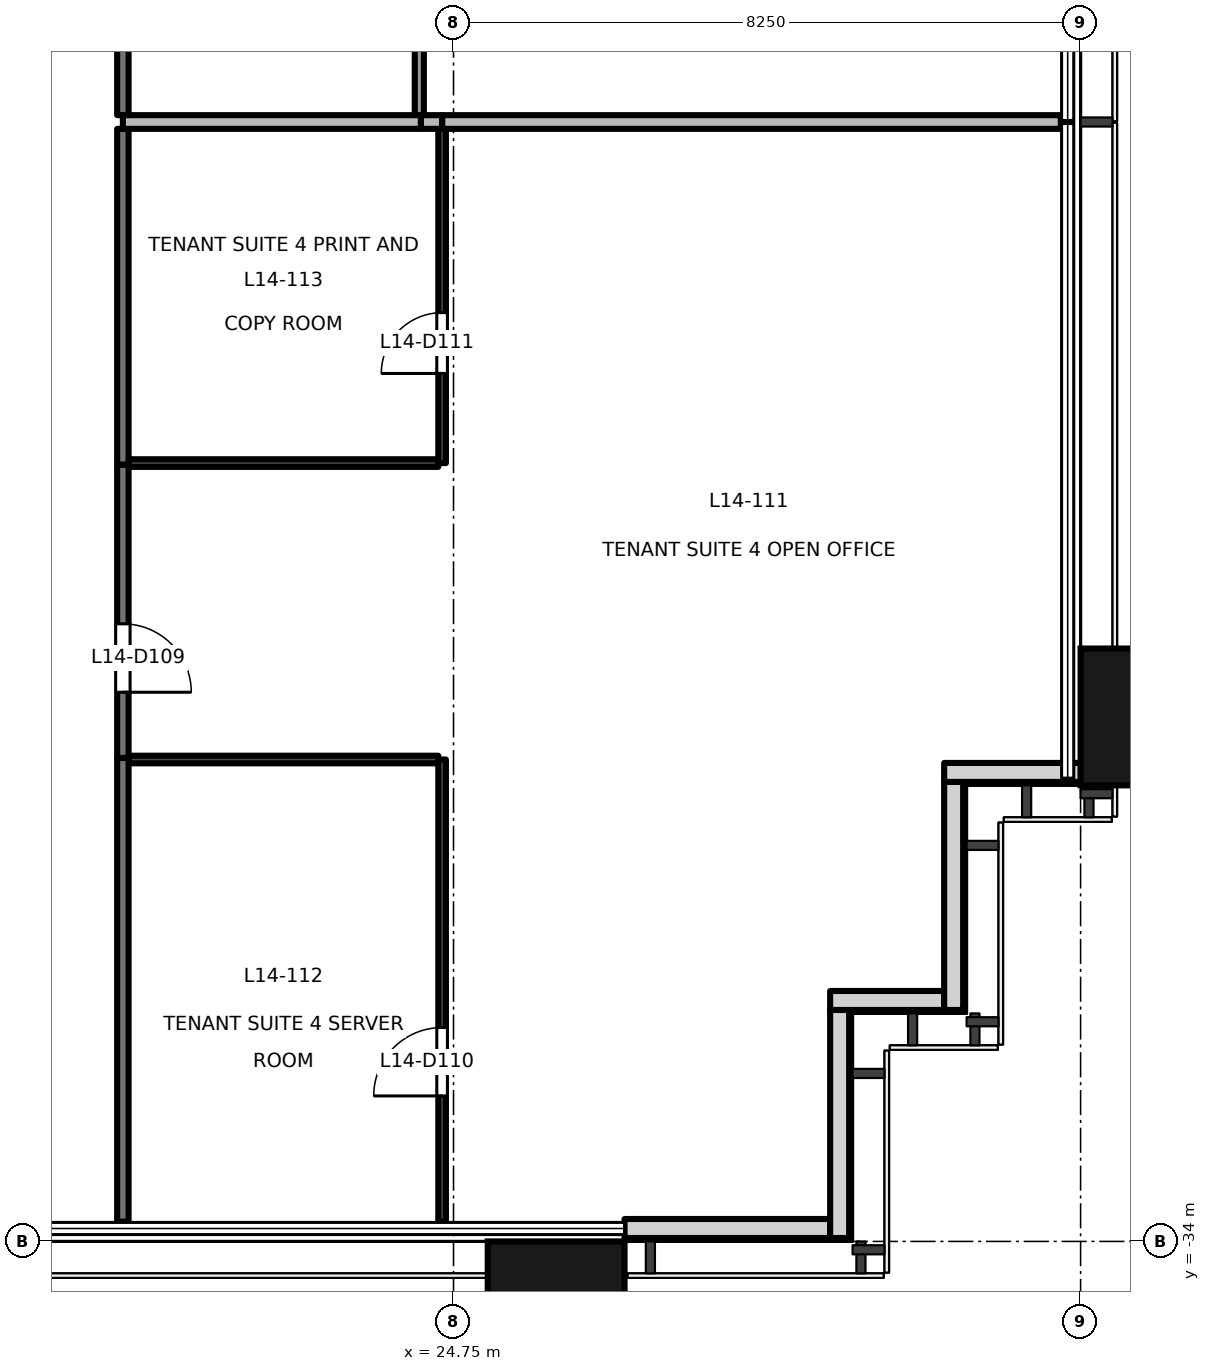
"""IFC4 building model, lengths in metres.
Left out: names, types, materials, properties, quantities, classifications, styles, units other than length and angle.
Written with IfcOpenShell. Run it as: python <this file> out.ifc"""

import sys

from ifc_helpers import new_model, si_unit, direction, frame, frame_2d, origin, origin_2d, place, context, subcontext, project, spatial, rectangle, extrude, element, fill, save


model = new_model("IFC4")
c1 = context("Model", 3, precision=1e-05, world=origin(), true_north=direction((0.0, 1.0)))
c2 = subcontext(c1, "Body", "Model", "MODEL_VIEW")
j1 = project(units=[si_unit("LENGTHUNIT", "METRE"), si_unit("PLANEANGLEUNIT", "RADIAN")], contexts=[c1])
p1 = place(None, origin())
s1 = spatial("IfcSite", under=j1, at=p1, CompositionType="ELEMENT")
p2 = place(p1, origin())
s2 = spatial("IfcBuilding", under=s1, at=p2, CompositionType="ELEMENT")
p3 = place(p2, frame((0.0, 0.0, 65.2)))
s3 = spatial("IfcBuildingStorey", under=s2, at=p3, CompositionType="ELEMENT", Elevation=65.2)
for number, where, z_axis, x_axis in (
    (1, (26.1, -34.9, -0.2), (0.0, 0.0, 1.0), (1.0, 0.0, 0.0)),
    (2, (33.9, -27.1, -0.2), (0.0, 0.0, 1.0), (0.0, 1.0, 0.0)),
):
    element("IfcColumn", number, at=place(p3, frame(where, z_axis=z_axis, x_axis=x_axis)), inside=s3, PredefinedType="COLUMN", context=c2, shape_type="SweptSolid", body=[
        extrude(rectangle(XDim=1.8, YDim=1.8, at=origin_2d()), origin(), (0.0, 0.0, 1.0), 4.1),
    ])
p4 = place(p3, frame((27.0, -33.83, 0.0), z_axis=(0.0, 0.0, 1.0), x_axis=(1.0, 0.0, 0.0)))
e3 = element("IfcWall", 3, at=p4, inside=s3, PredefinedType="SOLIDWALL", context=c2, shape_type="SweptSolid", body=[
    extrude(rectangle(XDim=2.705, YDim=0.25, at=frame_2d((1.353, 0.0))), origin(), (0.0, 0.0, 1.0), 3.9),
])
p5 = place(p3, frame((29.83, -33.955, 0.0), z_axis=(0.0, 0.0, 1.0), x_axis=(0.0, 1.0, 0.0)))
e4 = element("IfcWall", 4, at=p5, inside=s3, PredefinedType="SOLIDWALL", context=c2, shape_type="SweptSolid", body=[
    extrude(rectangle(XDim=3.0, YDim=0.25, at=frame_2d((1.5, 0.0))), origin(), (0.0, 0.0, 1.0), 3.9),
])
p6 = place(p3, frame((29.705, -30.83, 0.0), z_axis=(0.0, 0.0, 1.0), x_axis=(1.0, 0.0, 0.0)))
e5 = element("IfcWall", 5, at=p6, inside=s3, PredefinedType="SOLIDWALL", context=c2, shape_type="SweptSolid", body=[
    extrude(rectangle(XDim=1.5, YDim=0.25, at=frame_2d((0.75, 0.0))), origin(), (0.0, 0.0, 1.0), 3.9),
])
p7 = place(p3, frame((31.33, -30.955, 0.0), z_axis=(0.0, 0.0, 1.0), x_axis=(0.0, 1.0, 0.0)))
e6 = element("IfcWall", 6, at=p7, inside=s3, PredefinedType="SOLIDWALL", context=c2, shape_type="SweptSolid", body=[
    extrude(rectangle(XDim=3.0, YDim=0.25, at=frame_2d((1.5, 0.0))), origin(), (0.0, 0.0, 1.0), 3.9),
])
p8 = place(p3, frame((31.205, -27.83, 0.0), z_axis=(0.0, 0.0, 1.0), x_axis=(1.0, 0.0, 0.0)))
e7 = element("IfcWall", 7, at=p8, inside=s3, PredefinedType="SOLIDWALL", context=c2, shape_type="SweptSolid", body=[
    extrude(rectangle(XDim=1.8, YDim=0.25, at=frame_2d((0.9, 0.0))), origin(), (0.0, 0.0, 1.0), 3.9),
])
p9 = place(p3, frame((20.4, -23.78, 0.0), z_axis=(0.0, 0.0, 1.0), x_axis=(0.0, -1.0, 0.0)))
e8 = element("IfcWall", 8, at=p9, inside=s3, PredefinedType="PARTITIONING", context=c2, shape_type="SweptSolid", body=[
    extrude(rectangle(XDim=3.86, YDim=0.15, at=frame_2d((1.93, 0.0))), origin(), (0.0, 0.0, 1.0), 3.3),
])
p10 = place(p9, frame((2.095, 0.0, 0.0)))
e9 = element("IfcOpeningElement", 9, at=p10, cuts=e8, PredefinedType="OPENING", context=c2, shape_type="SweptSolid", body=[
    extrude(rectangle(XDim=0.9, YDim=2.1, at=frame_2d((0.45, 1.05))), frame((0.0, 0.085, 0.0), z_axis=(0.0, -1.0, 0.0), x_axis=(1.0, 0.0, 0.0)), (0.0, 0.0, 1.0), 0.171),
])
p11 = place(p3, frame((20.4, -27.64, 0.0), z_axis=(0.0, 0.0, 1.0), x_axis=(0.0, -1.0, 0.0)))
e10 = element("IfcWall", 10, at=p11, inside=s3, PredefinedType="PARTITIONING", context=c2, shape_type="SweptSolid", body=[
    extrude(rectangle(XDim=6.1, YDim=0.15, at=frame_2d((3.05, 0.0))), origin(), (0.0, 0.0, 1.0), 3.9),
])
p12 = place(p3, frame((20.4, -19.363, 0.0), z_axis=(0.0, 0.0, 1.0), x_axis=(0.0, -1.0, 0.0)))
e11 = element("IfcWall", 11, at=p12, inside=s3, PredefinedType="PARTITIONING", context=c2, shape_type="SweptSolid", body=[
    extrude(rectangle(XDim=4.417, YDim=0.15, at=frame_2d((2.208, 0.0))), origin(), (0.0, 0.0, 1.0), 3.3),
])
p13 = place(p3, frame((20.4, -10.253, 0.0), z_axis=(0.0, 0.0, 1.0), x_axis=(0.0, -1.0, 0.0)))
e12 = element("IfcWall", 12, at=p13, inside=s3, PredefinedType="PARTITIONING", context=c2, shape_type="SweptSolid", body=[
    extrude(rectangle(XDim=8.93, YDim=0.15, at=frame_2d((4.465, 0.0))), origin(), (0.0, 0.0, 1.0), 3.3),
])
p14 = place(p3, frame((24.55, -27.66, 0.0), z_axis=(0.0, 0.0, 1.0), x_axis=(-1.0, 0.0, 0.0)))
e13 = element("IfcWall", 13, at=p14, inside=s3, PredefinedType="PARTITIONING", context=c2, shape_type="SweptSolid", body=[
    extrude(rectangle(XDim=4.075, YDim=0.1, at=frame_2d((2.038, 0.0))), origin(), (0.0, 0.0, 1.0), 3.9),
])
p15 = place(p3, frame((24.6, -33.74, 0.0), z_axis=(0.0, 0.0, 1.0), x_axis=(0.0, 1.0, 0.0)))
e14 = element("IfcWall", 14, at=p15, inside=s3, PredefinedType="PARTITIONING", context=c2, shape_type="SweptSolid", body=[
    extrude(rectangle(XDim=6.08, YDim=0.1, at=frame_2d((3.04, 0.0))), origin(), (0.0, 0.0, 1.0), 3.9),
])
p16 = place(p15, frame((1.654, 0.0, 0.0)))
e15 = element("IfcOpeningElement", 15, at=p16, cuts=e14, PredefinedType="OPENING", context=c2, shape_type="SweptSolid", body=[
    extrude(rectangle(XDim=0.9, YDim=2.1, at=frame_2d((0.45, 1.05))), frame((0.0, 0.061, 0.0), z_axis=(0.0, -1.0, 0.0), x_axis=(1.0, 0.0, 0.0)), (0.0, 0.0, 1.0), 0.121),
])
p17 = place(p3, frame((20.475, -23.76, 0.0), z_axis=(0.0, 0.0, 1.0), x_axis=(1.0, 0.0, 0.0)))
e16 = element("IfcWall", 16, at=p17, inside=s3, PredefinedType="PARTITIONING", context=c2, shape_type="SweptSolid", body=[
    extrude(rectangle(XDim=4.075, YDim=0.1, at=frame_2d((2.038, 0.0))), origin(), (0.0, 0.0, 1.0), 3.9),
])
p18 = place(p3, frame((24.6, -23.76, 0.0), z_axis=(0.0, 0.0, 1.0), x_axis=(0.0, 1.0, 0.0)))
e17 = element("IfcWall", 17, at=p18, inside=s3, PredefinedType="PARTITIONING", context=c2, shape_type="SweptSolid", body=[
    extrude(rectangle(XDim=4.397, YDim=0.1, at=frame_2d((2.198, 0.0))), origin(), (0.0, 0.0, 1.0), 3.3),
])
p19 = place(p18, frame((1.179, 0.0, 0.0)))
e18 = element("IfcOpeningElement", 18, at=p19, cuts=e17, PredefinedType="OPENING", context=c2, shape_type="SweptSolid", body=[
    extrude(rectangle(XDim=0.8, YDim=2.1, at=frame_2d((0.4, 1.05))), frame((0.0, 0.061, 0.0), z_axis=(0.0, -1.0, 0.0), x_axis=(1.0, 0.0, 0.0)), (0.0, 0.0, 1.0), 0.121),
])
p20 = place(p3, frame((24.6, -19.273, 0.0), z_axis=(0.0, 0.0, 1.0), x_axis=(1.0, 0.0, 0.0)))
e19 = element("IfcWall", 19, at=p20, inside=s3, PredefinedType="PARTITIONING", context=c2, shape_type="SweptSolid", body=[
    extrude(rectangle(XDim=8.14, YDim=0.18, at=frame_2d((4.07, 0.0))), origin(), (0.0, 0.0, 1.0), 3.9),
])
p21 = place(p3, frame((24.32, -19.273, 0.0), z_axis=(0.0, 0.0, 1.0), x_axis=(1.0, 0.0, 0.0)))
e20 = element("IfcWall", 20, at=p21, inside=s3, PredefinedType="PARTITIONING", context=c2, shape_type="SweptSolid", body=[
    extrude(rectangle(XDim=0.28, YDim=0.18, at=frame_2d((0.14, 0.0))), origin(), (0.0, 0.0, 1.0), 3.9),
])
p22 = place(p3, frame((20.4, -19.273, 0.0), z_axis=(0.0, 0.0, 1.0), x_axis=(1.0, 0.0, 0.0)))
e21 = element("IfcWall", 21, at=p22, inside=s3, PredefinedType="PARTITIONING", context=c2, shape_type="SweptSolid", body=[
    extrude(rectangle(XDim=3.92, YDim=0.18, at=frame_2d((1.96, 0.0))), origin(), (0.0, 0.0, 1.0), 3.9),
])
p23 = place(p3, frame((24.3, -19.183, 0.0), z_axis=(0.0, 0.0, 1.0), x_axis=(0.0, 1.0, 0.0)))
e22 = element("IfcWall", 22, at=p23, inside=s3, PredefinedType="PARTITIONING", context=c2, shape_type="SweptSolid", body=[
    extrude(rectangle(XDim=8.91, YDim=0.12, at=frame_2d((4.455, 0.0))), origin(), (0.0, 0.0, 1.0), 3.3),
])
p24 = place(p23, frame((5.507, 0.0, 0.0)))
e23 = element("IfcOpeningElement", 23, at=p24, cuts=e22, PredefinedType="OPENING", context=c2, shape_type="SweptSolid", body=[
    extrude(rectangle(XDim=0.9, YDim=2.1, at=frame_2d((0.45, 1.05))), frame((0.0, 0.071, 0.0), z_axis=(0.0, -1.0, 0.0), x_axis=(1.0, 0.0, 0.0)), (0.0, 0.0, 1.0), 0.141),
])
p25 = place(p10, origin())
e24 = element("IfcDoor", 24, at=p25, inside=s3, OperationType="SINGLE_SWING_RIGHT", PredefinedType="DOOR", context=c2, shape_type="SweptSolid", body=[
    extrude(rectangle(XDim=0.9, YDim=2.1, at=frame_2d((0.45, 1.05))), frame((0.0, 0.025, 0.0), z_axis=(0.0, -1.0, 0.0), x_axis=(1.0, 0.0, 0.0)), (0.0, 0.0, 1.0), 0.05),
])
fill(e9, e24)
p26 = place(p16, origin())
e25 = element("IfcDoor", 25, at=p26, inside=s3, OperationType="SINGLE_SWING_LEFT", PredefinedType="DOOR", context=c2, shape_type="SweptSolid", body=[
    extrude(rectangle(XDim=0.9, YDim=2.1, at=frame_2d((0.45, 1.05))), frame((0.0, 0.025, 0.0), z_axis=(0.0, -1.0, 0.0), x_axis=(1.0, 0.0, 0.0)), (0.0, 0.0, 1.0), 0.05),
])
fill(e15, e25)
p27 = place(p19, origin())
e26 = element("IfcDoor", 26, at=p27, inside=s3, OperationType="SINGLE_SWING_LEFT", PredefinedType="DOOR", context=c2, shape_type="SweptSolid", body=[
    extrude(rectangle(XDim=0.8, YDim=2.1, at=frame_2d((0.4, 1.05))), frame((0.0, 0.025, 0.0), z_axis=(0.0, -1.0, 0.0), x_axis=(1.0, 0.0, 0.0)), (0.0, 0.0, 1.0), 0.05),
])
fill(e18, e26)
save(model, sys.argv[1])
